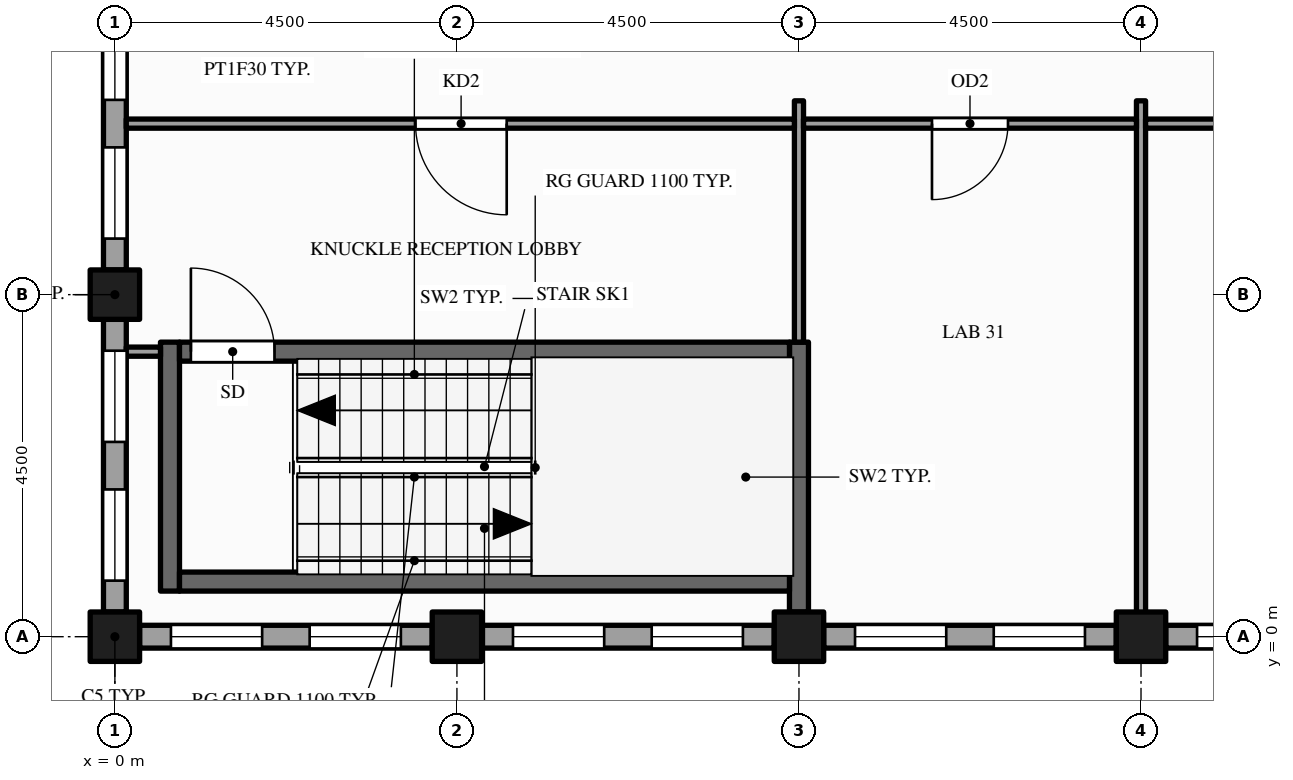
"""IFC4 building model, lengths in metres.
Left out: names, types, materials, properties, quantities, classifications, styles, units other than length and angle.
Written with IfcOpenShell. Run it as: python <this file> out.ifc"""

import sys

from ifc_helpers import new_model, si_unit, direction, frame, frame_2d, origin, origin_2d, place, context, subcontext, project, spatial, rectangle, hollow_rectangle, extrude, element, fill, save


model = new_model("IFC4")
c1 = context("Model", 3, precision=1e-05, world=origin(), true_north=direction((0.0, 1.0)))
c2 = subcontext(c1, "Body", "Model", "MODEL_VIEW")
j1 = project(units=[si_unit("LENGTHUNIT", "METRE"), si_unit("PLANEANGLEUNIT", "RADIAN")], contexts=[c1])
p1 = place(None, origin())
s1 = spatial("IfcSite", under=j1, at=p1, CompositionType="ELEMENT")
p2 = place(p1, origin())
s2 = spatial("IfcBuilding", under=s1, at=p2, CompositionType="ELEMENT")
p3 = place(p2, frame((0.0, 0.0, 273.0)))
s3 = spatial("IfcBuildingStorey", under=s2, at=p3, CompositionType="ELEMENT", Elevation=273.0)
for number, where, z_axis, x_axis in (
    (1, (0.0, 0.0, -0.15), (0.0, 0.0, 1.0), (1.0, 0.0, 0.0)),
    (2, (0.0, 4.5, -0.15), (0.0, 0.0, 1.0), (1.0, 0.0, 0.0)),
    (3, (4.5, 0.0, -0.15), (0.0, 0.0, 1.0), (1.0, 0.0, 0.0)),
    (4, (9.0, 0.0, -0.15), (0.0, 0.0, 1.0), (1.0, 0.0, 0.0)),
    (5, (13.5, 0.0, -0.15), (0.0, 0.0, 1.0), (1.0, 0.0, 0.0)),
):
    element("IfcColumn", number, at=place(p3, frame(where, z_axis=z_axis, x_axis=x_axis)), inside=s3, PredefinedType="COLUMN", context=c2, shape_type="SweptSolid", body=[
        extrude(hollow_rectangle(XDim=0.65, YDim=0.65, WallThickness=0.032, at=origin_2d()), origin(), (0.0, 0.0, 1.0), 4.0),
    ])
p4 = place(p3, frame((0.0, 8.675, 0.0), z_axis=(0.0, 0.0, 1.0), x_axis=(0.0, -1.0, 0.0)))
e6 = element("IfcWall", 6, at=p4, inside=s3, PredefinedType="STANDARD", context=c2, shape_type="SweptSolid", body=[
    extrude(rectangle(XDim=3.85, YDim=0.3, at=frame_2d((1.925, 0.0))), origin(), (0.0, 0.0, 1.0), 3.162),
])
p5 = place(p4, frame((0.413, 0.0, 0.9)))
e7 = element("IfcOpeningElement", 7, at=p5, cuts=e6, PredefinedType="OPENING", context=c2, shape_type="SweptSolid", body=[
    extrude(rectangle(XDim=1.2, YDim=2.0, at=frame_2d((0.6, 1.0))), frame((0.0, 0.16, 0.0), z_axis=(0.0, -1.0, 0.0), x_axis=(1.0, 0.0, 0.0)), (0.0, 0.0, 1.0), 0.32),
])
p6 = place(p4, frame((2.238, 0.0, 0.9)))
e8 = element("IfcOpeningElement", 8, at=p6, cuts=e6, PredefinedType="OPENING", context=c2, shape_type="SweptSolid", body=[
    extrude(rectangle(XDim=1.2, YDim=2.0, at=frame_2d((0.6, 1.0))), frame((0.0, 0.16, 0.0), z_axis=(0.0, -1.0, 0.0), x_axis=(1.0, 0.0, 0.0)), (0.0, 0.0, 1.0), 0.32),
])
p7 = place(p3, frame((0.0, 4.175, 0.0), z_axis=(0.0, 0.0, 1.0), x_axis=(0.0, -1.0, 0.0)))
e9 = element("IfcWall", 9, at=p7, inside=s3, PredefinedType="STANDARD", context=c2, shape_type="SweptSolid", body=[
    extrude(rectangle(XDim=3.85, YDim=0.3, at=frame_2d((1.925, 0.0))), origin(), (0.0, 0.0, 1.0), 3.162),
])
p8 = place(p7, frame((0.413, 0.0, 0.9)))
e10 = element("IfcOpeningElement", 10, at=p8, cuts=e9, PredefinedType="OPENING", context=c2, shape_type="SweptSolid", body=[
    extrude(rectangle(XDim=1.2, YDim=2.0, at=frame_2d((0.6, 1.0))), frame((0.0, 0.16, 0.0), z_axis=(0.0, -1.0, 0.0), x_axis=(1.0, 0.0, 0.0)), (0.0, 0.0, 1.0), 0.32),
])
p9 = place(p7, frame((2.238, 0.0, 0.9)))
e11 = element("IfcOpeningElement", 11, at=p9, cuts=e9, PredefinedType="OPENING", context=c2, shape_type="SweptSolid", body=[
    extrude(rectangle(XDim=1.2, YDim=2.0, at=frame_2d((0.6, 1.0))), frame((0.0, 0.16, 0.0), z_axis=(0.0, -1.0, 0.0), x_axis=(1.0, 0.0, 0.0)), (0.0, 0.0, 1.0), 0.32),
])
p10 = place(p3, frame((0.325, 0.0, 0.0), z_axis=(0.0, 0.0, 1.0), x_axis=(1.0, 0.0, 0.0)))
e12 = element("IfcWall", 12, at=p10, inside=s3, PredefinedType="STANDARD", context=c2, shape_type="SweptSolid", body=[
    extrude(rectangle(XDim=3.85, YDim=0.3, at=frame_2d((1.925, 0.0))), origin(), (0.0, 0.0, 1.0), 3.162),
])
p11 = place(p10, frame((0.413, 0.0, 0.9)))
e13 = element("IfcOpeningElement", 13, at=p11, cuts=e12, PredefinedType="OPENING", context=c2, shape_type="SweptSolid", body=[
    extrude(rectangle(XDim=1.2, YDim=2.0, at=frame_2d((0.6, 1.0))), frame((0.0, 0.16, 0.0), z_axis=(0.0, -1.0, 0.0), x_axis=(1.0, 0.0, 0.0)), (0.0, 0.0, 1.0), 0.32),
])
p12 = place(p10, frame((2.238, 0.0, 0.9)))
e14 = element("IfcOpeningElement", 14, at=p12, cuts=e12, PredefinedType="OPENING", context=c2, shape_type="SweptSolid", body=[
    extrude(rectangle(XDim=1.2, YDim=2.0, at=frame_2d((0.6, 1.0))), frame((0.0, 0.16, 0.0), z_axis=(0.0, -1.0, 0.0), x_axis=(1.0, 0.0, 0.0)), (0.0, 0.0, 1.0), 0.32),
])
p13 = place(p3, frame((4.825, 0.0, 0.0), z_axis=(0.0, 0.0, 1.0), x_axis=(1.0, 0.0, 0.0)))
e15 = element("IfcWall", 15, at=p13, inside=s3, PredefinedType="STANDARD", context=c2, shape_type="SweptSolid", body=[
    extrude(rectangle(XDim=3.85, YDim=0.3, at=frame_2d((1.925, 0.0))), origin(), (0.0, 0.0, 1.0), 3.162),
])
p14 = place(p13, frame((0.413, 0.0, 0.9)))
e16 = element("IfcOpeningElement", 16, at=p14, cuts=e15, PredefinedType="OPENING", context=c2, shape_type="SweptSolid", body=[
    extrude(rectangle(XDim=1.2, YDim=2.0, at=frame_2d((0.6, 1.0))), frame((0.0, 0.16, 0.0), z_axis=(0.0, -1.0, 0.0), x_axis=(1.0, 0.0, 0.0)), (0.0, 0.0, 1.0), 0.32),
])
p15 = place(p13, frame((2.238, 0.0, 0.9)))
e17 = element("IfcOpeningElement", 17, at=p15, cuts=e15, PredefinedType="OPENING", context=c2, shape_type="SweptSolid", body=[
    extrude(rectangle(XDim=1.2, YDim=2.0, at=frame_2d((0.6, 1.0))), frame((0.0, 0.16, 0.0), z_axis=(0.0, -1.0, 0.0), x_axis=(1.0, 0.0, 0.0)), (0.0, 0.0, 1.0), 0.32),
])
p16 = place(p3, frame((9.325, 0.0, 0.0), z_axis=(0.0, 0.0, 1.0), x_axis=(1.0, 0.0, 0.0)))
e18 = element("IfcWall", 18, at=p16, inside=s3, PredefinedType="STANDARD", context=c2, shape_type="SweptSolid", body=[
    extrude(rectangle(XDim=3.85, YDim=0.3, at=frame_2d((1.925, 0.0))), origin(), (0.0, 0.0, 1.0), 2.87),
])
p17 = place(p16, frame((0.413, 0.0, 0.9)))
e19 = element("IfcOpeningElement", 19, at=p17, cuts=e18, PredefinedType="OPENING", context=c2, shape_type="SweptSolid", body=[
    extrude(rectangle(XDim=1.2, YDim=1.75, at=frame_2d((0.6, 0.875))), frame((0.0, 0.16, 0.0), z_axis=(0.0, -1.0, 0.0), x_axis=(1.0, 0.0, 0.0)), (0.0, 0.0, 1.0), 0.32),
])
p18 = place(p16, frame((2.238, 0.0, 0.9)))
e20 = element("IfcOpeningElement", 20, at=p18, cuts=e18, PredefinedType="OPENING", context=c2, shape_type="SweptSolid", body=[
    extrude(rectangle(XDim=1.2, YDim=1.75, at=frame_2d((0.6, 0.875))), frame((0.0, 0.16, 0.0), z_axis=(0.0, -1.0, 0.0), x_axis=(1.0, 0.0, 0.0)), (0.0, 0.0, 1.0), 0.32),
])
p19 = place(p3, frame((13.825, 0.0, 0.0), z_axis=(0.0, 0.0, 1.0), x_axis=(1.0, 0.0, 0.0)))
e21 = element("IfcWall", 21, at=p19, inside=s3, PredefinedType="STANDARD", context=c2, shape_type="SweptSolid", body=[
    extrude(rectangle(XDim=3.85, YDim=0.3, at=frame_2d((1.925, 0.0))), origin(), (0.0, 0.0, 1.0), 2.87),
])
p20 = place(p19, frame((0.413, 0.0, 0.9)))
e22 = element("IfcOpeningElement", 22, at=p20, cuts=e21, PredefinedType="OPENING", context=c2, shape_type="SweptSolid", body=[
    extrude(rectangle(XDim=1.2, YDim=1.75, at=frame_2d((0.6, 0.875))), frame((0.0, 0.16, 0.0), z_axis=(0.0, -1.0, 0.0), x_axis=(1.0, 0.0, 0.0)), (0.0, 0.0, 1.0), 0.32),
])
p21 = place(p19, frame((2.238, 0.0, 0.9)))
e23 = element("IfcOpeningElement", 23, at=p21, cuts=e21, PredefinedType="OPENING", context=c2, shape_type="SweptSolid", body=[
    extrude(rectangle(XDim=1.2, YDim=1.75, at=frame_2d((0.6, 0.875))), frame((0.0, 0.16, 0.0), z_axis=(0.0, -1.0, 0.0), x_axis=(1.0, 0.0, 0.0)), (0.0, 0.0, 1.0), 0.32),
])
p22 = place(p3, frame((0.725, 0.6, 0.0), z_axis=(0.0, 0.0, 1.0), x_axis=(0.0, 1.0, 0.0)))
e24 = element("IfcWall", 24, at=p22, inside=s3, PredefinedType="SHEAR", context=c2, shape_type="SweptSolid", body=[
    extrude(rectangle(XDim=3.275, YDim=0.25, at=frame_2d((1.637, 0.0))), origin(), (0.0, 0.0, 1.0), 3.85),
])
p23 = place(p3, frame((9.0, 0.325, 0.0), z_axis=(0.0, 0.0, 1.0), x_axis=(0.0, 1.0, 0.0)))
e25 = element("IfcWall", 25, at=p23, inside=s3, PredefinedType="SHEAR", context=c2, shape_type="SweptSolid", body=[
    extrude(rectangle(XDim=3.55, YDim=0.25, at=frame_2d((1.775, 0.0))), origin(), (0.0, 0.0, 1.0), 3.85),
])
p24 = place(p3, frame((9.0, 3.875, 0.0), z_axis=(0.0, 0.0, 1.0), x_axis=(0.0, 1.0, 0.0)))
e26 = element("IfcWall", 26, at=p24, inside=s3, PredefinedType="PARTITIONING", context=c2, shape_type="SweptSolid", body=[
    extrude(rectangle(XDim=3.175, YDim=0.12, at=frame_2d((1.587, 0.0))), origin(), (0.0, 0.0, 1.0), 2.87),
])
p25 = place(p3, frame((13.5, 0.15, 0.0), z_axis=(0.0, 0.0, 1.0), x_axis=(0.0, 1.0, 0.0)))
e27 = element("IfcWall", 27, at=p25, inside=s3, PredefinedType="PARTITIONING", context=c2, shape_type="SweptSolid", body=[
    extrude(rectangle(XDim=6.9, YDim=0.12, at=frame_2d((3.45, 0.0))), origin(), (0.0, 0.0, 1.0), 2.87),
])
p26 = place(p3, frame((0.85, 0.725, 0.0), z_axis=(0.0, 0.0, 1.0), x_axis=(1.0, 0.0, 0.0)))
e28 = element("IfcWall", 28, at=p26, inside=s3, PredefinedType="SHEAR", context=c2, shape_type="SweptSolid", body=[
    extrude(rectangle(XDim=8.025, YDim=0.25, at=frame_2d((4.012, 0.0))), origin(), (0.0, 0.0, 1.0), 3.85),
])
p27 = place(p3, frame((0.15, 3.75, 0.0), z_axis=(0.0, 0.0, 1.0), x_axis=(1.0, 0.0, 0.0)))
e29 = element("IfcWall", 29, at=p27, inside=s3, PredefinedType="PARTITIONING", context=c2, shape_type="SweptSolid", body=[
    extrude(rectangle(XDim=0.45, YDim=0.12, at=frame_2d((0.225, 0.0))), origin(), (0.0, 0.0, 1.0), 3.85),
])
p28 = place(p3, frame((0.85, 3.75, 0.0), z_axis=(0.0, 0.0, 1.0), x_axis=(1.0, 0.0, 0.0)))
e30 = element("IfcWall", 30, at=p28, inside=s3, PredefinedType="SHEAR", context=c2, shape_type="SweptSolid", body=[
    extrude(rectangle(XDim=8.025, YDim=0.25, at=frame_2d((4.012, 0.0))), origin(), (0.0, 0.0, 1.0), 3.85),
])
p29 = place(p28, frame((0.15, 0.0, 0.0)))
e31 = element("IfcOpeningElement", 31, at=p29, cuts=e30, PredefinedType="OPENING", context=c2, shape_type="SweptSolid", body=[
    extrude(rectangle(XDim=1.1, YDim=2.1, at=frame_2d((0.55, 1.05))), frame((0.0, 0.135, 0.0), z_axis=(0.0, -1.0, 0.0), x_axis=(1.0, 0.0, 0.0)), (0.0, 0.0, 1.0), 0.27),
])
p30 = place(p3, frame((0.15, 6.75, 0.0), z_axis=(0.0, 0.0, 1.0), x_axis=(1.0, 0.0, 0.0)))
e32 = element("IfcWall", 32, at=p30, inside=s3, PredefinedType="PARTITIONING", context=c2, shape_type="SweptSolid", body=[
    extrude(rectangle(XDim=8.79, YDim=0.12, at=frame_2d((4.395, 0.0))), origin(), (0.0, 0.0, 1.0), 2.87),
])
p31 = place(p30, frame((3.805, 0.0, 0.0)))
e33 = element("IfcOpeningElement", 33, at=p31, cuts=e32, PredefinedType="OPENING", context=c2, shape_type="SweptSolid", body=[
    extrude(rectangle(XDim=1.2, YDim=2.1, at=frame_2d((0.6, 1.05))), frame((0.0, 0.07, 0.0), z_axis=(0.0, -1.0, 0.0), x_axis=(1.0, 0.0, 0.0)), (0.0, 0.0, 1.0), 0.14),
])
p32 = place(p3, frame((9.06, 6.75, 0.0), z_axis=(0.0, 0.0, 1.0), x_axis=(1.0, 0.0, 0.0)))
e34 = element("IfcWall", 34, at=p32, inside=s3, PredefinedType="PARTITIONING", context=c2, shape_type="SweptSolid", body=[
    extrude(rectangle(XDim=4.38, YDim=0.12, at=frame_2d((2.19, 0.0))), origin(), (0.0, 0.0, 1.0), 2.87),
])
p33 = place(p32, frame((1.69, 0.0, 0.0)))
e35 = element("IfcOpeningElement", 35, at=p33, cuts=e34, PredefinedType="OPENING", context=c2, shape_type="SweptSolid", body=[
    extrude(rectangle(XDim=1.0, YDim=2.1, at=frame_2d((0.5, 1.05))), frame((0.0, 0.07, 0.0), z_axis=(0.0, -1.0, 0.0), x_axis=(1.0, 0.0, 0.0)), (0.0, 0.0, 1.0), 0.14),
])
p34 = place(p3, frame((13.56, 6.75, 0.0), z_axis=(0.0, 0.0, 1.0), x_axis=(1.0, 0.0, 0.0)))
e36 = element("IfcWall", 36, at=p34, inside=s3, PredefinedType="PARTITIONING", context=c2, shape_type="SweptSolid", body=[
    extrude(rectangle(XDim=4.38, YDim=0.12, at=frame_2d((2.19, 0.0))), origin(), (0.0, 0.0, 1.0), 2.87),
])
p35 = place(p34, frame((1.69, 0.0, 0.0)))
e37 = element("IfcOpeningElement", 37, at=p35, cuts=e36, PredefinedType="OPENING", context=c2, shape_type="SweptSolid", body=[
    extrude(rectangle(XDim=1.0, YDim=2.1, at=frame_2d((0.5, 1.05))), frame((0.0, 0.07, 0.0), z_axis=(0.0, -1.0, 0.0), x_axis=(1.0, 0.0, 0.0)), (0.0, 0.0, 1.0), 0.14),
])
p36 = place(p5, origin())
e38 = element("IfcWindow", 38, at=p36, inside=s3, PartitioningType="SINGLE_PANEL", PredefinedType="WINDOW", context=c2, shape_type="SweptSolid", body=[
    extrude(rectangle(XDim=1.2, YDim=2.0, at=frame_2d((0.6, 1.0))), frame((0.0, 0.03, 0.0), z_axis=(0.0, -1.0, 0.0), x_axis=(1.0, 0.0, 0.0)), (0.0, 0.0, 1.0), 0.06),
])
fill(e7, e38)
p37 = place(p6, origin())
e39 = element("IfcWindow", 39, at=p37, inside=s3, PartitioningType="SINGLE_PANEL", PredefinedType="WINDOW", context=c2, shape_type="SweptSolid", body=[
    extrude(rectangle(XDim=1.2, YDim=2.0, at=frame_2d((0.6, 1.0))), frame((0.0, 0.03, 0.0), z_axis=(0.0, -1.0, 0.0), x_axis=(1.0, 0.0, 0.0)), (0.0, 0.0, 1.0), 0.06),
])
fill(e8, e39)
p38 = place(p8, origin())
e40 = element("IfcWindow", 40, at=p38, inside=s3, PartitioningType="SINGLE_PANEL", PredefinedType="WINDOW", context=c2, shape_type="SweptSolid", body=[
    extrude(rectangle(XDim=1.2, YDim=2.0, at=frame_2d((0.6, 1.0))), frame((0.0, 0.03, 0.0), z_axis=(0.0, -1.0, 0.0), x_axis=(1.0, 0.0, 0.0)), (0.0, 0.0, 1.0), 0.06),
])
fill(e10, e40)
p39 = place(p9, origin())
e41 = element("IfcWindow", 41, at=p39, inside=s3, PartitioningType="SINGLE_PANEL", PredefinedType="WINDOW", context=c2, shape_type="SweptSolid", body=[
    extrude(rectangle(XDim=1.2, YDim=2.0, at=frame_2d((0.6, 1.0))), frame((0.0, 0.03, 0.0), z_axis=(0.0, -1.0, 0.0), x_axis=(1.0, 0.0, 0.0)), (0.0, 0.0, 1.0), 0.06),
])
fill(e11, e41)
p40 = place(p11, origin())
e42 = element("IfcWindow", 42, at=p40, inside=s3, PartitioningType="SINGLE_PANEL", PredefinedType="WINDOW", context=c2, shape_type="SweptSolid", body=[
    extrude(rectangle(XDim=1.2, YDim=2.0, at=frame_2d((0.6, 1.0))), frame((0.0, 0.03, 0.0), z_axis=(0.0, -1.0, 0.0), x_axis=(1.0, 0.0, 0.0)), (0.0, 0.0, 1.0), 0.06),
])
fill(e13, e42)
p41 = place(p12, origin())
e43 = element("IfcWindow", 43, at=p41, inside=s3, PartitioningType="SINGLE_PANEL", PredefinedType="WINDOW", context=c2, shape_type="SweptSolid", body=[
    extrude(rectangle(XDim=1.2, YDim=2.0, at=frame_2d((0.6, 1.0))), frame((0.0, 0.03, 0.0), z_axis=(0.0, -1.0, 0.0), x_axis=(1.0, 0.0, 0.0)), (0.0, 0.0, 1.0), 0.06),
])
fill(e14, e43)
p42 = place(p14, origin())
e44 = element("IfcWindow", 44, at=p42, inside=s3, PartitioningType="SINGLE_PANEL", PredefinedType="WINDOW", context=c2, shape_type="SweptSolid", body=[
    extrude(rectangle(XDim=1.2, YDim=2.0, at=frame_2d((0.6, 1.0))), frame((0.0, 0.03, 0.0), z_axis=(0.0, -1.0, 0.0), x_axis=(1.0, 0.0, 0.0)), (0.0, 0.0, 1.0), 0.06),
])
fill(e16, e44)
p43 = place(p15, origin())
e45 = element("IfcWindow", 45, at=p43, inside=s3, PartitioningType="SINGLE_PANEL", PredefinedType="WINDOW", context=c2, shape_type="SweptSolid", body=[
    extrude(rectangle(XDim=1.2, YDim=2.0, at=frame_2d((0.6, 1.0))), frame((0.0, 0.03, 0.0), z_axis=(0.0, -1.0, 0.0), x_axis=(1.0, 0.0, 0.0)), (0.0, 0.0, 1.0), 0.06),
])
fill(e17, e45)
p44 = place(p17, origin())
e46 = element("IfcWindow", 46, at=p44, inside=s3, PartitioningType="SINGLE_PANEL", PredefinedType="WINDOW", context=c2, shape_type="SweptSolid", body=[
    extrude(rectangle(XDim=1.2, YDim=1.75, at=frame_2d((0.6, 0.875))), frame((0.0, 0.03, 0.0), z_axis=(0.0, -1.0, 0.0), x_axis=(1.0, 0.0, 0.0)), (0.0, 0.0, 1.0), 0.06),
])
fill(e19, e46)
p45 = place(p18, origin())
e47 = element("IfcWindow", 47, at=p45, inside=s3, PartitioningType="SINGLE_PANEL", PredefinedType="WINDOW", context=c2, shape_type="SweptSolid", body=[
    extrude(rectangle(XDim=1.2, YDim=1.75, at=frame_2d((0.6, 0.875))), frame((0.0, 0.03, 0.0), z_axis=(0.0, -1.0, 0.0), x_axis=(1.0, 0.0, 0.0)), (0.0, 0.0, 1.0), 0.06),
])
fill(e20, e47)
p46 = place(p20, origin())
e48 = element("IfcWindow", 48, at=p46, inside=s3, PartitioningType="SINGLE_PANEL", PredefinedType="WINDOW", context=c2, shape_type="SweptSolid", body=[
    extrude(rectangle(XDim=1.2, YDim=1.75, at=frame_2d((0.6, 0.875))), frame((0.0, 0.03, 0.0), z_axis=(0.0, -1.0, 0.0), x_axis=(1.0, 0.0, 0.0)), (0.0, 0.0, 1.0), 0.06),
])
fill(e22, e48)
p47 = place(p29, origin())
e49 = element("IfcDoor", 49, at=p47, inside=s3, OperationType="SINGLE_SWING_LEFT", PredefinedType="DOOR", context=c2, shape_type="SweptSolid", body=[
    extrude(rectangle(XDim=1.1, YDim=2.1, at=frame_2d((0.55, 1.05))), frame((0.0, 0.025, 0.0), z_axis=(0.0, -1.0, 0.0), x_axis=(1.0, 0.0, 0.0)), (0.0, 0.0, 1.0), 0.05),
])
fill(e31, e49)
p48 = place(p31, origin())
e50 = element("IfcDoor", 50, at=p48, inside=s3, OperationType="SINGLE_SWING_RIGHT", PredefinedType="DOOR", context=c2, shape_type="SweptSolid", body=[
    extrude(rectangle(XDim=1.2, YDim=2.1, at=frame_2d((0.6, 1.05))), frame((0.0, 0.025, 0.0), z_axis=(0.0, -1.0, 0.0), x_axis=(1.0, 0.0, 0.0)), (0.0, 0.0, 1.0), 0.05),
])
fill(e33, e50)
p49 = place(p33, origin())
e51 = element("IfcDoor", 51, at=p49, inside=s3, OperationType="SINGLE_SWING_LEFT", PredefinedType="DOOR", context=c2, shape_type="SweptSolid", body=[
    extrude(rectangle(XDim=1.0, YDim=2.1, at=frame_2d((0.5, 1.05))), frame((0.0, 0.025, 0.0), z_axis=(0.0, -1.0, 0.0), x_axis=(1.0, 0.0, 0.0)), (0.0, 0.0, 1.0), 0.05),
])
fill(e35, e51)
save(model, sys.argv[1])
